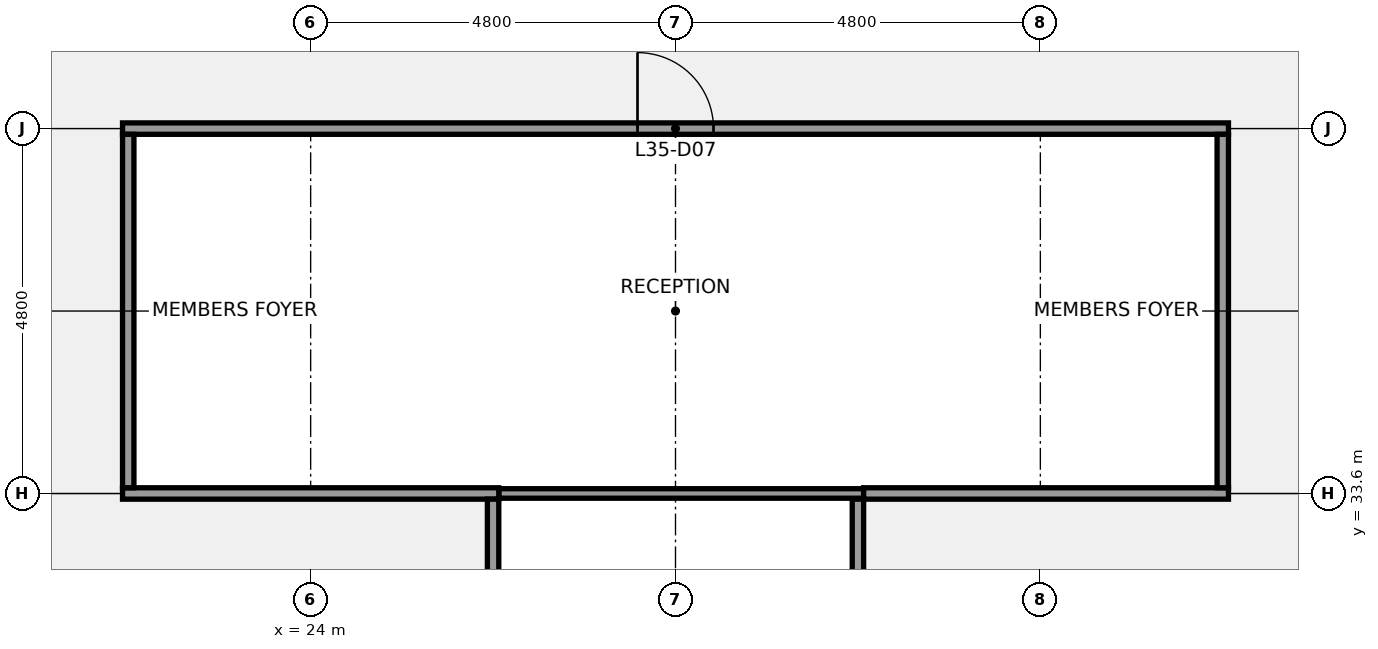
"""IFC4 building model, lengths in metres.
Left out: names, types, materials, properties, quantities, classifications, styles, units other than length and angle.
Written with IfcOpenShell. Run it as: python <this file> out.ifc"""

import sys

from ifc_helpers import new_model, si_unit, direction, frame, frame_2d, origin, place, context, subcontext, project, spatial, rectangle, extrude, element, fill, save


model = new_model("IFC4")
c1 = context("Model", 3, precision=1e-05, world=origin(), true_north=direction((0.0, 1.0)))
c2 = subcontext(c1, "Body", "Model", "MODEL_VIEW")
j1 = project(units=[si_unit("LENGTHUNIT", "METRE"), si_unit("PLANEANGLEUNIT", "RADIAN")], contexts=[c1])
p1 = place(None, origin())
s1 = spatial("IfcSite", under=j1, at=p1, CompositionType="ELEMENT")
p2 = place(p1, origin())
s2 = spatial("IfcBuilding", under=s1, at=p2, CompositionType="ELEMENT")
p3 = place(p2, frame((0.0, 0.0, 160.1)))
s3 = spatial("IfcBuildingStorey", under=s2, at=p3, CompositionType="ELEMENT", Elevation=160.1)
p4 = place(p3, frame((26.475, 33.6, 0.0), z_axis=(0.0, 0.0, 1.0), x_axis=(1.0, 0.0, 0.0)))
e1 = element("IfcWall", 1, at=p4, inside=s3, PredefinedType="PARTITIONING", context=c2, shape_type="SweptSolid", body=[
    extrude(rectangle(XDim=4.8, YDim=0.125, at=frame_2d((2.4, 0.0))), origin(), (0.0, 0.0, 1.0), 2.849),
])
p5 = place(p3, frame((21.525, 33.6, 0.0), z_axis=(0.0, 0.0, 1.0), x_axis=(1.0, 0.0, 0.0)))
e2 = element("IfcWall", 2, at=p5, inside=s3, PredefinedType="PARTITIONING", context=c2, shape_type="SweptSolid", body=[
    extrude(rectangle(XDim=4.95, YDim=0.15, at=frame_2d((2.475, 0.0))), origin(), (0.0, 0.0, 1.0), 2.849),
])
p6 = place(p3, frame((31.275, 33.6, 0.0), z_axis=(0.0, 0.0, 1.0), x_axis=(1.0, 0.0, 0.0)))
e3 = element("IfcWall", 3, at=p6, inside=s3, PredefinedType="PARTITIONING", context=c2, shape_type="SweptSolid", body=[
    extrude(rectangle(XDim=4.8, YDim=0.15, at=frame_2d((2.4, 0.0))), origin(), (0.0, 0.0, 1.0), 2.849),
])
p7 = place(p3, frame((21.525, 38.4, 0.0), z_axis=(0.0, 0.0, 1.0), x_axis=(1.0, 0.0, 0.0)))
e4 = element("IfcWall", 4, at=p7, inside=s3, PredefinedType="PARTITIONING", context=c2, shape_type="SweptSolid", body=[
    extrude(rectangle(XDim=14.55, YDim=0.15, at=frame_2d((7.275, 0.0))), origin(), (0.0, 0.0, 1.0), 2.849),
])
p8 = place(p7, frame((6.775, 0.0, 0.0)))
e5 = element("IfcOpeningElement", 5, at=p8, cuts=e4, PredefinedType="OPENING", context=c2, shape_type="SweptSolid", body=[
    extrude(rectangle(XDim=1.0, YDim=2.1, at=frame_2d((0.5, 1.05))), frame((0.0, 0.085, 0.0), z_axis=(0.0, -1.0, 0.0), x_axis=(1.0, 0.0, 0.0)), (0.0, 0.0, 1.0), 0.17),
])
p9 = place(p3, frame((21.6, 33.675, 0.0), z_axis=(0.0, 0.0, 1.0), x_axis=(0.0, 1.0, 0.0)))
e6 = element("IfcWall", 6, at=p9, inside=s3, PredefinedType="PARTITIONING", context=c2, shape_type="SweptSolid", body=[
    extrude(rectangle(XDim=4.65, YDim=0.15, at=frame_2d((2.325, 0.0))), origin(), (0.0, 0.0, 1.0), 2.849),
])
for number, where, z_axis, x_axis in (
    (7, (26.4, 30.075, 0.0), (0.0, 0.0, 1.0), (0.0, 1.0, 0.0)),
    (8, (31.2, 30.075, 0.0), (0.0, 0.0, 1.0), (0.0, 1.0, 0.0)),
):
    element("IfcWall", number, at=place(p3, frame(where, z_axis=z_axis, x_axis=x_axis)), inside=s3, PredefinedType="PARTITIONING", context=c2, shape_type="SweptSolid", body=[
        extrude(rectangle(XDim=3.45, YDim=0.15, at=frame_2d((1.725, 0.0))), origin(), (0.0, 0.0, 1.0), 2.849),
    ])
p10 = place(p3, frame((36.0, 33.675, 0.0), z_axis=(0.0, 0.0, 1.0), x_axis=(0.0, 1.0, 0.0)))
e9 = element("IfcWall", 9, at=p10, inside=s3, PredefinedType="PARTITIONING", context=c2, shape_type="SweptSolid", body=[
    extrude(rectangle(XDim=4.65, YDim=0.15, at=frame_2d((2.325, 0.0))), origin(), (0.0, 0.0, 1.0), 2.849),
])
p11 = place(p8, origin())
e10 = element("IfcDoor", 10, at=p11, inside=s3, OperationType="SINGLE_SWING_LEFT", PredefinedType="DOOR", context=c2, shape_type="SweptSolid", body=[
    extrude(rectangle(XDim=1.0, YDim=2.1, at=frame_2d((0.5, 1.05))), frame((0.0, 0.025, 0.0), z_axis=(0.0, -1.0, 0.0), x_axis=(1.0, 0.0, 0.0)), (0.0, 0.0, 1.0), 0.05),
])
fill(e5, e10)
save(model, sys.argv[1])
